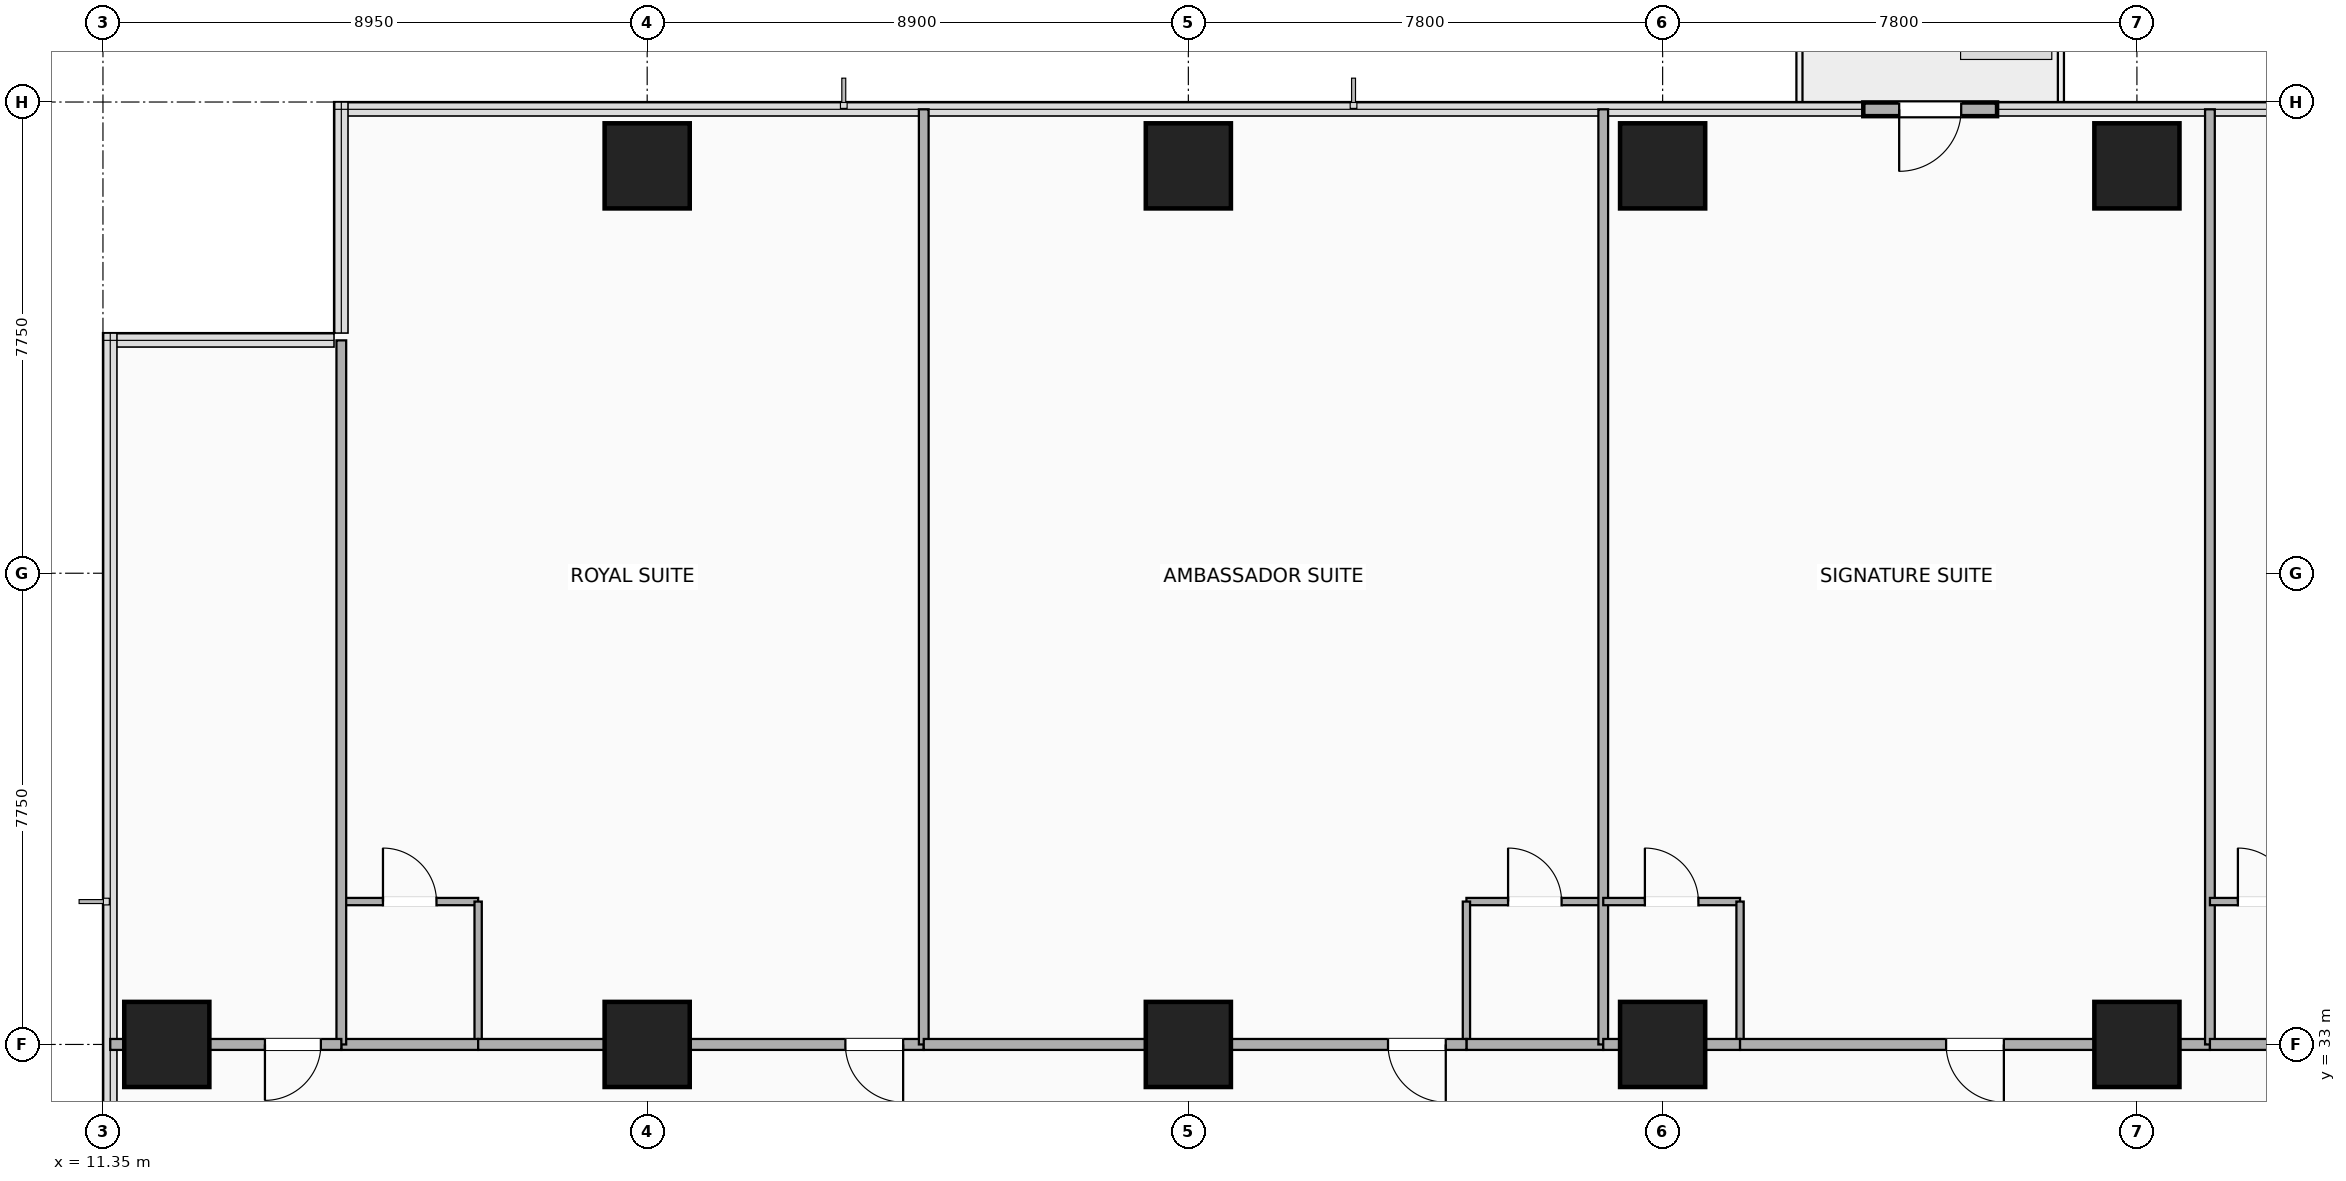
"""IFC4 building model, lengths in metres.
Left out: names, types, materials, properties, quantities, classifications, styles, units other than length and angle.
Written with IfcOpenShell. Run it as: python <this file> out.ifc"""

import sys

from ifc_helpers import new_model, si_unit, direction, frame, frame_2d, origin, origin_2d, place, context, subcontext, project, spatial, rectangle, extrude, element, fill, save


model = new_model("IFC4")
c1 = context("Model", 3, precision=1e-05, world=origin(), true_north=direction((0.0, 1.0)))
c2 = subcontext(c1, "Body", "Model", "MODEL_VIEW")
j1 = project(units=[si_unit("LENGTHUNIT", "METRE"), si_unit("PLANEANGLEUNIT", "RADIAN")], contexts=[c1])
p1 = place(None, origin())
s1 = spatial("IfcSite", under=j1, at=p1, CompositionType="ELEMENT")
p2 = place(p1, origin())
s2 = spatial("IfcBuilding", under=s1, at=p2, CompositionType="ELEMENT")
p3 = place(p2, frame((0.0, 0.0, 50.9)))
s3 = spatial("IfcBuildingStorey", under=s2, at=p3, CompositionType="ELEMENT", Elevation=50.9)
for number, where, z_axis, x_axis in (
    (1, (20.3, 33.0, -0.28), (0.0, 0.0, 1.0), (1.0, 0.0, 0.0)),
    (2, (29.2, 33.0, -0.28), (0.0, 0.0, 1.0), (1.0, 0.0, 0.0)),
    (3, (37.0, 33.0, -0.28), (0.0, 0.0, 1.0), (1.0, 0.0, 0.0)),
    (4, (44.8, 33.0, -0.28), (0.0, 0.0, 1.0), (1.0, 0.0, 0.0)),
    (5, (12.4, 33.0, -0.28), (0.0, 0.0, 1.0), (1.0, 0.0, 0.0)),
    (6, (20.3, 47.45, -0.28), (0.0, 0.0, 1.0), (1.0, 0.0, 0.0)),
    (7, (29.2, 47.45, -0.28), (0.0, 0.0, 1.0), (1.0, 0.0, 0.0)),
    (8, (37.0, 47.45, -0.28), (0.0, 0.0, 1.0), (1.0, 0.0, 0.0)),
    (9, (44.8, 47.45, -0.28), (0.0, 0.0, 1.0), (1.0, 0.0, 0.0)),
):
    element("IfcColumn", number, at=place(p3, frame(where, z_axis=z_axis, x_axis=x_axis)), inside=s3, PredefinedType="COLUMN", context=c2, shape_type="SweptSolid", body=[
        extrude(rectangle(XDim=1.4, YDim=1.4, at=origin_2d()), origin(), (0.0, 0.0, 1.0), 3.5),
    ])
p4 = place(p3, frame((40.3, 48.38, 0.0), z_axis=(0.0, 0.0, 1.0), x_axis=(1.0, 0.0, 0.0)))
e10 = element("IfcWall", 10, at=p4, inside=s3, PredefinedType="SOLIDWALL", context=c2, shape_type="SweptSolid", body=[
    extrude(rectangle(XDim=2.2, YDim=0.225, at=frame_2d((1.1, 0.0))), origin(), (0.0, 0.0, 1.0), 3.22),
])
p5 = place(p4, frame((0.59, 0.0, 0.0)))
e11 = element("IfcOpeningElement", 11, at=p5, cuts=e10, PredefinedType="OPENING", context=c2, shape_type="SweptSolid", body=[
    extrude(rectangle(XDim=1.02, YDim=2.1, at=frame_2d((0.51, 1.05))), frame((0.0, 0.123, 0.0), z_axis=(0.0, -1.0, 0.0), x_axis=(1.0, 0.0, 0.0)), (0.0, 0.0, 1.0), 0.245),
])
p6 = place(p3, frame((15.27, 35.35, 0.0), z_axis=(0.0, 0.0, 1.0), x_axis=(1.0, 0.0, 0.0)))
e12 = element("IfcWall", 12, at=p6, inside=s3, PredefinedType="PARTITIONING", context=c2, shape_type="SweptSolid", body=[
    extrude(rectangle(XDim=2.25, YDim=0.12, at=frame_2d((1.125, 0.0))), origin(), (0.0, 0.0, 1.0), 3.22),
])
p7 = place(p6, frame((1.565, 0.0, 0.0), z_axis=(0.0, 0.0, 1.0), x_axis=(-1.0, 0.0, 0.0)))
e13 = element("IfcOpeningElement", 13, at=p7, cuts=e12, PredefinedType="OPENING", context=c2, shape_type="SweptSolid", body=[
    extrude(rectangle(XDim=0.88, YDim=2.08, at=frame_2d((0.44, 1.04))), frame((0.0, 0.07, 0.0), z_axis=(0.0, -1.0, 0.0), x_axis=(1.0, 0.0, 0.0)), (0.0, 0.0, 1.0), 0.14),
])
p8 = place(p3, frame((17.52, 33.0, 0.0), z_axis=(0.0, 0.0, 1.0), x_axis=(0.0, 1.0, 0.0)))
e14 = element("IfcWall", 14, at=p8, inside=s3, PredefinedType="PARTITIONING", context=c2, shape_type="SweptSolid", body=[
    extrude(rectangle(XDim=2.35, YDim=0.12, at=frame_2d((1.175, 0.0))), origin(), (0.0, 0.0, 1.0), 2.51),
])
p9 = place(p3, frame((15.27, 33.0, 0.0), z_axis=(0.0, 0.0, 1.0), x_axis=(1.0, 0.0, 0.0)))
e15 = element("IfcWall", 15, at=p9, inside=s3, PredefinedType="PARTITIONING", context=c2, shape_type="SweptSolid", body=[
    extrude(rectangle(XDim=2.25, YDim=0.18, at=frame_2d((1.125, 0.0))), origin(), (0.0, 0.0, 1.0), 2.51),
])
p10 = place(p3, frame((17.52, 33.0, 0.0), z_axis=(0.0, 0.0, 1.0), x_axis=(1.0, 0.0, 0.0)))
e16 = element("IfcWall", 16, at=p10, inside=s3, PredefinedType="PARTITIONING", context=c2, shape_type="SweptSolid", body=[
    extrude(rectangle(XDim=7.328, YDim=0.18, at=frame_2d((3.664, 0.0))), origin(), (0.0, 0.0, 1.0), 2.51),
])
p11 = place(p10, frame((6.04, 0.0, 0.0)))
e17 = element("IfcOpeningElement", 17, at=p11, cuts=e16, PredefinedType="OPENING", context=c2, shape_type="SweptSolid", body=[
    extrude(rectangle(XDim=0.95, YDim=2.15, at=frame_2d((0.475, 1.075))), frame((0.0, 0.1, 0.0), z_axis=(0.0, -1.0, 0.0), x_axis=(1.0, 0.0, 0.0)), (0.0, 0.0, 1.0), 0.2),
])
p12 = place(p3, frame((15.27, 33.0, 0.0), z_axis=(0.0, 0.0, 1.0), x_axis=(0.0, 1.0, 0.0)))
e18 = element("IfcWall", 18, at=p12, inside=s3, PredefinedType="PARTITIONING", context=c2, shape_type="SweptSolid", body=[
    extrude(rectangle(XDim=11.58, YDim=0.16, at=frame_2d((5.79, 0.0))), origin(), (0.0, 0.0, 1.0), 2.51),
])
p13 = place(p3, frame((24.848, 33.0, 0.0), z_axis=(0.0, 0.0, 1.0), x_axis=(0.0, 1.0, 0.0)))
e19 = element("IfcWall", 19, at=p13, inside=s3, PredefinedType="PARTITIONING", context=c2, shape_type="SweptSolid", body=[
    extrude(rectangle(XDim=15.38, YDim=0.16, at=frame_2d((7.69, 0.0))), origin(), (0.0, 0.0, 1.0), 2.51),
])
p14 = place(p3, frame((33.773, 35.35, 0.0), z_axis=(0.0, 0.0, 1.0), x_axis=(1.0, 0.0, 0.0)))
e20 = element("IfcWall", 20, at=p14, inside=s3, PredefinedType="PARTITIONING", context=c2, shape_type="SweptSolid", body=[
    extrude(rectangle(XDim=2.25, YDim=0.12, at=frame_2d((1.125, 0.0))), origin(), (0.0, 0.0, 1.0), 3.22),
])
p15 = place(p14, frame((1.565, 0.0, 0.0), z_axis=(0.0, 0.0, 1.0), x_axis=(-1.0, 0.0, 0.0)))
e21 = element("IfcOpeningElement", 21, at=p15, cuts=e20, PredefinedType="OPENING", context=c2, shape_type="SweptSolid", body=[
    extrude(rectangle(XDim=0.88, YDim=2.08, at=frame_2d((0.44, 1.04))), frame((0.0, 0.07, 0.0), z_axis=(0.0, -1.0, 0.0), x_axis=(1.0, 0.0, 0.0)), (0.0, 0.0, 1.0), 0.14),
])
p16 = place(p3, frame((33.773, 33.0, 0.0), z_axis=(0.0, 0.0, 1.0), x_axis=(0.0, 1.0, 0.0)))
e22 = element("IfcWall", 22, at=p16, inside=s3, PredefinedType="PARTITIONING", context=c2, shape_type="SweptSolid", body=[
    extrude(rectangle(XDim=2.35, YDim=0.12, at=frame_2d((1.175, 0.0))), origin(), (0.0, 0.0, 1.0), 2.51),
])
p17 = place(p3, frame((33.773, 33.0, 0.0), z_axis=(0.0, 0.0, 1.0), x_axis=(1.0, 0.0, 0.0)))
e23 = element("IfcWall", 23, at=p17, inside=s3, PredefinedType="PARTITIONING", context=c2, shape_type="SweptSolid", body=[
    extrude(rectangle(XDim=2.25, YDim=0.18, at=frame_2d((1.125, 0.0))), origin(), (0.0, 0.0, 1.0), 2.51),
])
p18 = place(p3, frame((24.848, 33.0, 0.0), z_axis=(0.0, 0.0, 1.0), x_axis=(1.0, 0.0, 0.0)))
e24 = element("IfcWall", 24, at=p18, inside=s3, PredefinedType="PARTITIONING", context=c2, shape_type="SweptSolid", body=[
    extrude(rectangle(XDim=8.925, YDim=0.18, at=frame_2d((4.462, 0.0))), origin(), (0.0, 0.0, 1.0), 2.51),
])
p19 = place(p18, frame((7.635, 0.0, 0.0)))
e25 = element("IfcOpeningElement", 25, at=p19, cuts=e24, PredefinedType="OPENING", context=c2, shape_type="SweptSolid", body=[
    extrude(rectangle(XDim=0.95, YDim=2.15, at=frame_2d((0.475, 1.075))), frame((0.0, 0.1, 0.0), z_axis=(0.0, -1.0, 0.0), x_axis=(1.0, 0.0, 0.0)), (0.0, 0.0, 1.0), 0.2),
])
p20 = place(p3, frame((36.023, 33.0, 0.0), z_axis=(0.0, 0.0, 1.0), x_axis=(0.0, 1.0, 0.0)))
e26 = element("IfcWall", 26, at=p20, inside=s3, PredefinedType="PARTITIONING", context=c2, shape_type="SweptSolid", body=[
    extrude(rectangle(XDim=15.38, YDim=0.16, at=frame_2d((7.69, 0.0))), origin(), (0.0, 0.0, 1.0), 2.51),
])
p21 = place(p3, frame((36.023, 35.35, 0.0), z_axis=(0.0, 0.0, 1.0), x_axis=(1.0, 0.0, 0.0)))
e27 = element("IfcWall", 27, at=p21, inside=s3, PredefinedType="PARTITIONING", context=c2, shape_type="SweptSolid", body=[
    extrude(rectangle(XDim=2.25, YDim=0.12, at=frame_2d((1.125, 0.0))), origin(), (0.0, 0.0, 1.0), 2.51),
])
p22 = place(p21, frame((1.565, 0.0, 0.0), z_axis=(0.0, 0.0, 1.0), x_axis=(-1.0, 0.0, 0.0)))
e28 = element("IfcOpeningElement", 28, at=p22, cuts=e27, PredefinedType="OPENING", context=c2, shape_type="SweptSolid", body=[
    extrude(rectangle(XDim=0.88, YDim=2.08, at=frame_2d((0.44, 1.04))), frame((0.0, 0.07, 0.0), z_axis=(0.0, -1.0, 0.0), x_axis=(1.0, 0.0, 0.0)), (0.0, 0.0, 1.0), 0.14),
])
p23 = place(p3, frame((38.273, 33.0, 0.0), z_axis=(0.0, 0.0, 1.0), x_axis=(0.0, 1.0, 0.0)))
e29 = element("IfcWall", 29, at=p23, inside=s3, PredefinedType="PARTITIONING", context=c2, shape_type="SweptSolid", body=[
    extrude(rectangle(XDim=2.35, YDim=0.12, at=frame_2d((1.175, 0.0))), origin(), (0.0, 0.0, 1.0), 2.51),
])
p24 = place(p3, frame((36.023, 33.0, 0.0), z_axis=(0.0, 0.0, 1.0), x_axis=(1.0, 0.0, 0.0)))
e30 = element("IfcWall", 30, at=p24, inside=s3, PredefinedType="PARTITIONING", context=c2, shape_type="SweptSolid", body=[
    extrude(rectangle(XDim=2.25, YDim=0.18, at=frame_2d((1.125, 0.0))), origin(), (0.0, 0.0, 1.0), 2.51),
])
p25 = place(p3, frame((38.273, 33.0, 0.0), z_axis=(0.0, 0.0, 1.0), x_axis=(1.0, 0.0, 0.0)))
e31 = element("IfcWall", 31, at=p25, inside=s3, PredefinedType="PARTITIONING", context=c2, shape_type="SweptSolid", body=[
    extrude(rectangle(XDim=7.728, YDim=0.18, at=frame_2d((3.864, 0.0))), origin(), (0.0, 0.0, 1.0), 2.51),
])
p26 = place(p25, frame((3.389, 0.0, 0.0)))
e32 = element("IfcOpeningElement", 32, at=p26, cuts=e31, PredefinedType="OPENING", context=c2, shape_type="SweptSolid", body=[
    extrude(rectangle(XDim=0.95, YDim=2.15, at=frame_2d((0.475, 1.075))), frame((0.0, 0.1, 0.0), z_axis=(0.0, -1.0, 0.0), x_axis=(1.0, 0.0, 0.0)), (0.0, 0.0, 1.0), 0.2),
])
p27 = place(p3, frame((46.001, 33.0, 0.0), z_axis=(0.0, 0.0, 1.0), x_axis=(0.0, 1.0, 0.0)))
e33 = element("IfcWall", 33, at=p27, inside=s3, PredefinedType="PARTITIONING", context=c2, shape_type="SweptSolid", body=[
    extrude(rectangle(XDim=15.38, YDim=0.16, at=frame_2d((7.69, 0.0))), origin(), (0.0, 0.0, 1.0), 2.51),
])
p28 = place(p3, frame((46.001, 35.35, 0.0), z_axis=(0.0, 0.0, 1.0), x_axis=(1.0, 0.0, 0.0)))
e34 = element("IfcWall", 34, at=p28, inside=s3, PredefinedType="PARTITIONING", context=c2, shape_type="SweptSolid", body=[
    extrude(rectangle(XDim=1.8, YDim=0.12, at=frame_2d((0.9, 0.0))), origin(), (0.0, 0.0, 1.0), 3.22),
])
p29 = place(p28, frame((1.34, 0.0, 0.0), z_axis=(0.0, 0.0, 1.0), x_axis=(-1.0, 0.0, 0.0)))
e35 = element("IfcOpeningElement", 35, at=p29, cuts=e34, PredefinedType="OPENING", context=c2, shape_type="SweptSolid", body=[
    extrude(rectangle(XDim=0.88, YDim=2.08, at=frame_2d((0.44, 1.04))), frame((0.0, 0.07, 0.0), z_axis=(0.0, -1.0, 0.0), x_axis=(1.0, 0.0, 0.0)), (0.0, 0.0, 1.0), 0.14),
])
p30 = place(p3, frame((46.001, 33.0, 0.0), z_axis=(0.0, 0.0, 1.0), x_axis=(1.0, 0.0, 0.0)))
e36 = element("IfcWall", 36, at=p30, inside=s3, PredefinedType="PARTITIONING", context=c2, shape_type="SweptSolid", body=[
    extrude(rectangle(XDim=1.8, YDim=0.18, at=frame_2d((0.9, 0.0))), origin(), (0.0, 0.0, 1.0), 2.51),
])
p31 = place(p3, frame((11.47, 33.0, 0.0), z_axis=(0.0, 0.0, 1.0), x_axis=(1.0, 0.0, 0.0)))
e37 = element("IfcWall", 37, at=p31, inside=s3, PredefinedType="PARTITIONING", context=c2, shape_type="SweptSolid", body=[
    extrude(rectangle(XDim=3.8, YDim=0.18, at=frame_2d((1.9, 0.0))), origin(), (0.0, 0.0, 1.0), 2.51),
])
p32 = place(p31, frame((2.544, 0.0, 0.0)))
e38 = element("IfcOpeningElement", 38, at=p32, cuts=e37, PredefinedType="OPENING", context=c2, shape_type="SweptSolid", body=[
    extrude(rectangle(XDim=0.92, YDim=2.08, at=frame_2d((0.46, 1.04))), frame((0.0, 0.1, 0.0), z_axis=(0.0, -1.0, 0.0), x_axis=(1.0, 0.0, 0.0)), (0.0, 0.0, 1.0), 0.2),
])
p33 = place(p5, origin())
e39 = element("IfcDoor", 39, at=p33, inside=s3, OperationType="SINGLE_SWING_LEFT", PredefinedType="DOOR", context=c2, shape_type="SweptSolid", body=[
    extrude(rectangle(XDim=1.02, YDim=2.1, at=frame_2d((0.51, 1.05))), frame((0.0, 0.025, 0.0), z_axis=(0.0, -1.0, 0.0), x_axis=(1.0, 0.0, 0.0)), (0.0, 0.0, 1.0), 0.05),
])
fill(e11, e39)
p34 = place(p7, origin())
e40 = element("IfcDoor", 40, at=p34, inside=s3, OperationType="SINGLE_SWING_LEFT", PredefinedType="DOOR", context=c2, shape_type="SweptSolid", body=[
    extrude(rectangle(XDim=0.88, YDim=2.08, at=frame_2d((0.44, 1.04))), frame((0.0, 0.025, 0.0), z_axis=(0.0, -1.0, 0.0), x_axis=(1.0, 0.0, 0.0)), (0.0, 0.0, 1.0), 0.05),
])
fill(e13, e40)
p35 = place(p11, origin())
e41 = element("IfcDoor", 41, at=p35, inside=s3, OperationType="SINGLE_SWING_RIGHT", PredefinedType="DOOR", context=c2, shape_type="SweptSolid", body=[
    extrude(rectangle(XDim=0.95, YDim=2.15, at=frame_2d((0.475, 1.075))), frame((0.0, 0.025, 0.0), z_axis=(0.0, -1.0, 0.0), x_axis=(1.0, 0.0, 0.0)), (0.0, 0.0, 1.0), 0.05),
])
fill(e17, e41)
p36 = place(p15, origin())
e42 = element("IfcDoor", 42, at=p36, inside=s3, OperationType="SINGLE_SWING_LEFT", PredefinedType="DOOR", context=c2, shape_type="SweptSolid", body=[
    extrude(rectangle(XDim=0.88, YDim=2.08, at=frame_2d((0.44, 1.04))), frame((0.0, 0.025, 0.0), z_axis=(0.0, -1.0, 0.0), x_axis=(1.0, 0.0, 0.0)), (0.0, 0.0, 1.0), 0.05),
])
fill(e21, e42)
p37 = place(p19, origin())
e43 = element("IfcDoor", 43, at=p37, inside=s3, OperationType="SINGLE_SWING_RIGHT", PredefinedType="DOOR", context=c2, shape_type="SweptSolid", body=[
    extrude(rectangle(XDim=0.95, YDim=2.15, at=frame_2d((0.475, 1.075))), frame((0.0, 0.025, 0.0), z_axis=(0.0, -1.0, 0.0), x_axis=(1.0, 0.0, 0.0)), (0.0, 0.0, 1.0), 0.05),
])
fill(e25, e43)
p38 = place(p22, origin())
e44 = element("IfcDoor", 44, at=p38, inside=s3, OperationType="SINGLE_SWING_LEFT", PredefinedType="DOOR", context=c2, shape_type="SweptSolid", body=[
    extrude(rectangle(XDim=0.88, YDim=2.08, at=frame_2d((0.44, 1.04))), frame((0.0, 0.025, 0.0), z_axis=(0.0, -1.0, 0.0), x_axis=(1.0, 0.0, 0.0)), (0.0, 0.0, 1.0), 0.05),
])
fill(e28, e44)
p39 = place(p26, origin())
e45 = element("IfcDoor", 45, at=p39, inside=s3, OperationType="SINGLE_SWING_RIGHT", PredefinedType="DOOR", context=c2, shape_type="SweptSolid", body=[
    extrude(rectangle(XDim=0.95, YDim=2.15, at=frame_2d((0.475, 1.075))), frame((0.0, 0.025, 0.0), z_axis=(0.0, -1.0, 0.0), x_axis=(1.0, 0.0, 0.0)), (0.0, 0.0, 1.0), 0.05),
])
fill(e32, e45)
p40 = place(p29, origin())
e46 = element("IfcDoor", 46, at=p40, inside=s3, OperationType="SINGLE_SWING_LEFT", PredefinedType="DOOR", context=c2, shape_type="SweptSolid", body=[
    extrude(rectangle(XDim=0.88, YDim=2.08, at=frame_2d((0.44, 1.04))), frame((0.0, 0.025, 0.0), z_axis=(0.0, -1.0, 0.0), x_axis=(1.0, 0.0, 0.0)), (0.0, 0.0, 1.0), 0.05),
])
fill(e35, e46)
p41 = place(p32, origin())
e47 = element("IfcDoor", 47, at=p41, inside=s3, OperationType="SINGLE_SWING_LEFT", PredefinedType="DOOR", context=c2, shape_type="SweptSolid", body=[
    extrude(rectangle(XDim=0.92, YDim=2.08, at=frame_2d((0.46, 1.04))), frame((0.0, 0.025, 0.0), z_axis=(0.0, -1.0, 0.0), x_axis=(1.0, 0.0, 0.0)), (0.0, 0.0, 1.0), 0.05),
])
fill(e38, e47)
save(model, sys.argv[1])
